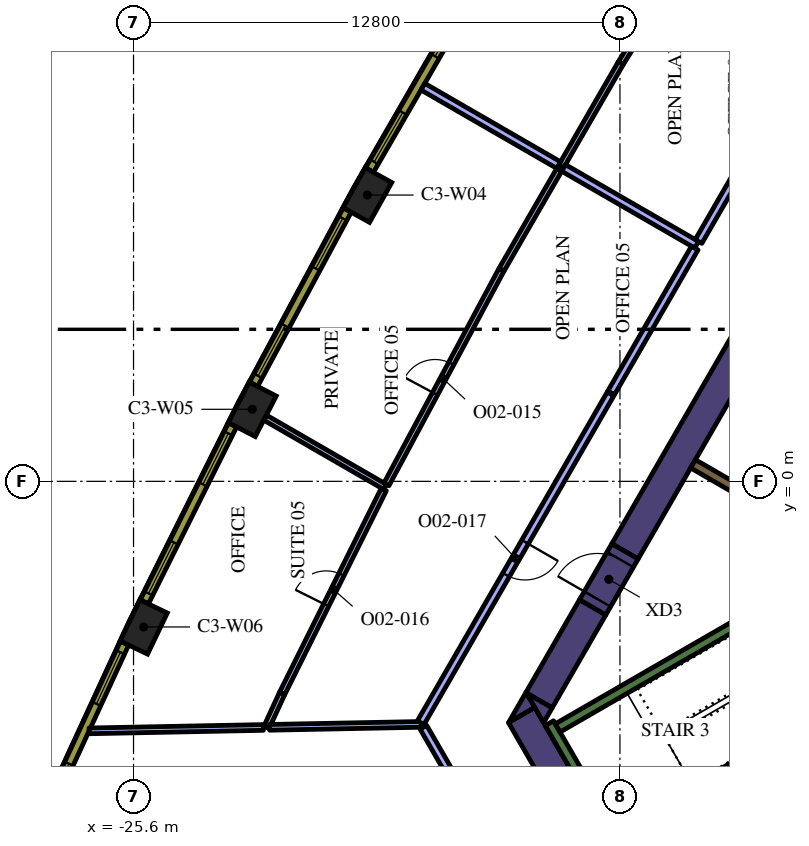
"""IFC4 building model, lengths in metres.
Left out: names, types, materials, properties, quantities, classifications, styles, units other than length and angle.
Written with IfcOpenShell. Run it as: python <this file> out.ifc"""

import sys

from ifc_helpers import new_model, si_unit, direction, frame, frame_2d, origin, origin_2d, place, context, subcontext, project, spatial, polyline, rectangle, outline, extrude, element, fill, save


model = new_model("IFC4")
c1 = context("Model", 3, precision=1e-05, world=origin(), true_north=direction((0.0, 1.0)))
c2 = subcontext(c1, "Body", "Model", "MODEL_VIEW")
j1 = project(units=[si_unit("LENGTHUNIT", "METRE"), si_unit("PLANEANGLEUNIT", "RADIAN")], contexts=[c1])
p1 = place(None, origin())
s1 = spatial("IfcSite", under=j1, at=p1, CompositionType="ELEMENT")
p2 = place(p1, origin())
s2 = spatial("IfcBuilding", under=s1, at=p2, CompositionType="ELEMENT")
p3 = place(p2, frame((0.0, 0.0, 158.4)))
s3 = spatial("IfcBuildingStorey", under=s2, at=p3, CompositionType="ELEMENT", Elevation=158.4)
for number, where, z_axis, x_axis in (
    (1, (-19.447, 7.533, 0.0), (0.0, 0.0, 1.0), (-0.487, -0.874, 0.0)),
    (2, (-22.476, 1.896, 0.0), (0.0, 0.0, 1.0), (-0.46, -0.888, 0.0)),
    (3, (-25.332, -3.832, 0.0), (0.0, 0.0, 1.0), (-0.433, -0.902, 0.0)),
):
    element("IfcColumn", number, at=place(p3, frame(where, z_axis=z_axis, x_axis=x_axis)), inside=s3, PredefinedType="COLUMN", context=c2, shape_type="SweptSolid", body=[
        extrude(rectangle(XDim=1.2, YDim=0.8, at=origin_2d()), origin(), (0.0, 0.0, 1.0), 4.2),
    ])
p4 = place(p3, frame((-15.387, -6.148, 0.0), z_axis=(0.0, 0.0, 1.0), x_axis=(0.499984020225, -0.866034629516, 0.0)))
e4 = element("IfcWall", 4, at=p4, inside=s3, PredefinedType="SOLIDWALL", context=c2, shape_type="SweptSolid", body=[
    extrude(rectangle(XDim=3.824, YDim=0.8, at=frame_2d((1.912, 0.0))), origin(), (0.0, 0.0, 1.0), 4.2),
])
p5 = place(p3, origin())
e5 = element("IfcWall", 5, at=p5, inside=s3, PredefinedType="SOLIDWALL", context=c2, shape_type="SweptSolid", body=[
    extrude(outline(polyline([(-15.042, -5.947), (-15.729, -6.343), (-15.271, -5.55), (-15.042, -5.947)])), origin(), (0.0, 0.0, 1.0), 4.2),
])
p6 = place(p3, frame((-13.518, -3.314, 0.0), z_axis=(0.0, 0.0, 1.0), x_axis=(-0.499969377405, -0.866043083026, 0.0)))
e6 = element("IfcWall", 6, at=p6, inside=s3, PredefinedType="SOLIDWALL", context=c2, shape_type="SweptSolid", body=[
    extrude(rectangle(XDim=2.824, YDim=0.8, at=frame_2d((1.412, 0.0))), origin(), (0.0, 0.0, 1.0), 4.2),
])
e7 = element("IfcWall", 7, at=p5, inside=s3, PredefinedType="SOLIDWALL", context=c2, shape_type="SweptSolid", body=[
    extrude(outline(polyline([(-14.809, -6.35), (-15.257, -5.574), (-14.585, -5.962), (-14.809, -6.35)])), origin(), (0.0, 0.0, 1.0), 4.2),
])
p7 = place(p3, frame((-12.668, -1.842, 0.0), z_axis=(0.0, 0.0, 1.0), x_axis=(0.500003640647, 0.866023301845, 0.0)))
e8 = element("IfcWall", 8, at=p7, inside=s3, PredefinedType="SOLIDWALL", context=c2, shape_type="SweptSolid", body=[
    extrude(rectangle(XDim=15.858, YDim=0.8, at=frame_2d((7.929, 0.0))), origin(), (0.0, 0.0, 1.0), 4.2),
])
p8 = place(p3, frame((-12.84, -9.511, 0.0), z_axis=(0.0, 0.0, 1.0), x_axis=(-0.499997733992, 0.866026712061, 0.0)))
e9 = element("IfcWall", 9, at=p8, inside=s3, PredefinedType="SOLIDWALL", context=c2, shape_type="SweptSolid", body=[
    extrude(rectangle(XDim=3.634, YDim=0.25, at=frame_2d((1.817, 0.0))), origin(), (0.0, 0.0, 1.0), 4.2),
])
p9 = place(p3, frame((-14.44, -6.49, 0.0), z_axis=(0.0, 0.0, 1.0), x_axis=(0.866022966069, 0.500004222222, 0.0)))
e10 = element("IfcWall", 10, at=p9, inside=s3, PredefinedType="SOLIDWALL", context=c2, shape_type="SweptSolid", body=[
    extrude(rectangle(XDim=6.8, YDim=0.25, at=frame_2d((3.4, 0.0))), origin(), (0.0, 0.0, 1.0), 4.2),
])
p10 = place(p3, frame((-12.84, -9.261, 0.0), z_axis=(0.0, 0.0, 1.0), x_axis=(0.866016039709, 0.500016218704, 0.0)))
e11 = element("IfcWall", 11, at=p10, inside=s3, PredefinedType="SOLIDWALL", context=c2, shape_type="SweptSolid", body=[
    extrude(rectangle(XDim=7.05, YDim=0.25, at=frame_2d((3.525, 0.0))), origin(), (0.0, 0.0, 1.0), 4.2),
])
p11 = place(p3, frame((-8.106, -1.14, 0.0), z_axis=(0.0, 0.0, 1.0), x_axis=(-0.866008981251, 0.500028443584, 0.0)))
e12 = element("IfcWall", 12, at=p11, inside=s3, PredefinedType="SOLIDWALL", context=c2, shape_type="SweptSolid", body=[
    extrude(rectangle(XDim=3.2, YDim=0.25, at=frame_2d((1.6, 0.0))), origin(), (0.0, 0.0, 1.0), 4.2),
])
p12 = place(p3, frame((-13.518, -3.314, 0.0), z_axis=(0.0, 0.0, 1.0), x_axis=(0.500062241894, 0.865989465428, 0.0)))
e13 = element("IfcWall", 13, at=p12, inside=s3, PredefinedType="SOLIDWALL", context=c2, shape_type="SweptSolid", body=[
    extrude(rectangle(XDim=1.7, YDim=0.8, at=frame_2d((0.85, 0.0))), origin(), (0.0, 0.0, 1.0), 4.2),
])
p13 = place(p12, frame((0.25, 0.0, 0.0)))
e14 = element("IfcOpeningElement", 14, at=p13, cuts=e13, PredefinedType="OPENING", context=c2, shape_type="SweptSolid", body=[
    extrude(rectangle(XDim=1.2, YDim=2.1, at=frame_2d((0.6, 1.05))), frame((0.0, 0.41, 0.0), z_axis=(0.0, -1.0, 0.0), x_axis=(1.0, 0.0, 0.0)), (0.0, 0.0, 1.0), 0.82),
])
p14 = place(p3, frame((-12.779, 11.002, 0.0), z_axis=(0.0, 0.0, 1.0), x_axis=(0.527026092571, 0.849849102929, 0.0)))
e15 = element("IfcWall", 15, at=p14, inside=s3, PredefinedType="PARTITIONING", context=c2, shape_type="SweptSolid", body=[
    extrude(rectangle(XDim=6.407, YDim=0.15, at=frame_2d((3.204, 0.0))), origin(), (0.0, 0.0, 1.0), 3.15),
])
p15 = place(p14, frame((2.707, 0.0, 0.0)))
e16 = element("IfcOpeningElement", 16, at=p15, cuts=e15, PredefinedType="OPENING", context=c2, shape_type="SweptSolid", body=[
    extrude(rectangle(XDim=0.9, YDim=2.1, at=frame_2d((0.45, 1.05))), frame((0.0, 0.085, 0.0), z_axis=(0.0, -1.0, 0.0), x_axis=(1.0, 0.0, 0.0)), (0.0, 0.0, 1.0), 0.17),
])
p16 = place(p3, frame((-12.779, 11.002, 0.0), z_axis=(0.0, 0.0, 1.0), x_axis=(-0.499996312652, -0.866027532665, 0.0)))
e17 = element("IfcWall", 17, at=p16, inside=s3, PredefinedType="PARTITIONING", context=c2, shape_type="SweptSolid", body=[
    extrude(rectangle(XDim=3.138, YDim=0.15, at=frame_2d((1.569, 0.0))), origin(), (0.0, 0.0, 1.0), 3.15),
])
p17 = place(p3, frame((-14.413, 8.322, 0.0), z_axis=(0.0, 0.0, 1.0), x_axis=(-0.866034795751, 0.499983732284, 0.0)))
e18 = element("IfcWall", 18, at=p17, inside=s3, PredefinedType="PARTITIONING", context=c2, shape_type="SweptSolid", body=[
    extrude(rectangle(XDim=4.125, YDim=0.2, at=frame_2d((2.062, 0.0))), origin(), (0.0, 0.0, 1.0), 3.15),
])
p18 = place(p3, frame((-10.782, 6.225, 0.0), z_axis=(0.0, 0.0, 1.0), x_axis=(-0.866034752867, 0.499983806564, 0.0)))
e19 = element("IfcWall", 19, at=p18, inside=s3, PredefinedType="PARTITIONING", context=c2, shape_type="SweptSolid", body=[
    extrude(rectangle(XDim=4.043, YDim=0.2, at=frame_2d((2.021, 0.0))), origin(), (0.0, 0.0, 1.0), 3.15),
])
p19 = place(p3, frame((-8.532, 10.122, 0.0), z_axis=(0.0, 0.0, 1.0), x_axis=(-0.499988222896, -0.866032203192, 0.0)))
e20 = element("IfcWall", 20, at=p19, inside=s3, PredefinedType="PARTITIONING", context=c2, shape_type="SweptSolid", body=[
    extrude(rectangle(XDim=4.4, YDim=0.2, at=frame_2d((2.2, 0.0))), origin(), (0.0, 0.0, 1.0), 3.15),
])
p20 = place(p3, frame((-18.98, -0.147, 0.0), z_axis=(0.0, 0.0, 1.0), x_axis=(-0.866035116605, 0.499983176524, 0.0)))
e21 = element("IfcWall", 21, at=p20, inside=s3, PredefinedType="PARTITIONING", context=c2, shape_type="SweptSolid", body=[
    extrude(rectangle(XDim=3.648, YDim=0.15, at=frame_2d((1.824, 0.0))), origin(), (0.0, 0.0, 1.0), 3.15),
])
p21 = place(p3, frame((-14.398, 8.198, 0.0), z_axis=(0.0, 0.0, 1.0), x_axis=(-0.499993740961, -0.866029017412, 0.0)))
e22 = element("IfcWall", 22, at=p21, inside=s3, PredefinedType="PARTITIONING", context=c2, shape_type="SweptSolid", body=[
    extrude(rectangle(XDim=3.038, YDim=0.15, at=frame_2d((1.519, 0.0))), origin(), (0.0, 0.0, 1.0), 3.15),
])
p22 = place(p3, frame((-18.945, -0.081, 0.0), z_axis=(0.0, 0.0, 1.0), x_axis=(0.472485737981, 0.881338316088, 0.0)))
e23 = element("IfcWall", 23, at=p22, inside=s3, PredefinedType="PARTITIONING", context=c2, shape_type="SweptSolid", body=[
    extrude(rectangle(XDim=6.407, YDim=0.15, at=frame_2d((3.204, 0.0))), origin(), (0.0, 0.0, 1.0), 3.15),
])
p23 = place(p22, frame((2.707, 0.0, 0.0)))
e24 = element("IfcOpeningElement", 24, at=p23, cuts=e23, PredefinedType="OPENING", context=c2, shape_type="SweptSolid", body=[
    extrude(rectangle(XDim=0.9, YDim=2.1, at=frame_2d((0.45, 1.05))), frame((0.0, 0.085, 0.0), z_axis=(0.0, -1.0, 0.0), x_axis=(1.0, 0.0, 0.0)), (0.0, 0.0, 1.0), 0.17),
])
p24 = place(p3, frame((-21.689, -5.579, 0.0), z_axis=(0.0, 0.0, 1.0), x_axis=(0.446219729364, 0.894923434225, 0.0)))
e25 = element("IfcWall", 25, at=p24, inside=s3, PredefinedType="PARTITIONING", context=c2, shape_type="SweptSolid", body=[
    extrude(rectangle(XDim=5.995, YDim=0.15, at=frame_2d((2.998, 0.0))), origin(), (0.0, 0.0, 1.0), 3.15),
])
p25 = place(p24, frame((2.595, 0.0, 0.0)))
e26 = element("IfcOpeningElement", 26, at=p25, cuts=e25, PredefinedType="OPENING", context=c2, shape_type="SweptSolid", body=[
    extrude(rectangle(XDim=0.9, YDim=2.1, at=frame_2d((0.45, 1.05))), frame((0.0, 0.085, 0.0), z_axis=(0.0, -1.0, 0.0), x_axis=(1.0, 0.0, 0.0)), (0.0, 0.0, 1.0), 0.17),
])
p26 = place(p3, frame((-21.689, -5.579, 0.0), z_axis=(0.0, 0.0, 1.0), x_axis=(-0.418649696334, -0.908147802816, 0.0)))
e27 = element("IfcWall", 27, at=p26, inside=s3, PredefinedType="PARTITIONING", context=c2, shape_type="SweptSolid", body=[
    extrude(rectangle(XDim=0.986, YDim=0.15, at=frame_2d((0.493, 0.0))), origin(), (0.0, 0.0, 1.0), 3.15),
])
p27 = place(p3, frame((-22.185, -6.476, 0.0), z_axis=(0.0, 0.0, 1.0), x_axis=(-0.999810025733, -0.019491342784, 0.0)))
e28 = element("IfcWall", 28, at=p27, inside=s3, PredefinedType="PARTITIONING", context=c2, shape_type="SweptSolid", body=[
    extrude(rectangle(XDim=4.584, YDim=0.15, at=frame_2d((2.292, 0.0))), origin(), (0.0, 0.0, 1.0), 3.15),
])
p28 = place(p3, frame((-18.016, -6.395, 0.0), z_axis=(0.0, 0.0, 1.0), x_axis=(-0.999809528944, -0.019516808959, 0.0)))
e29 = element("IfcWall", 29, at=p28, inside=s3, PredefinedType="PARTITIONING", context=c2, shape_type="SweptSolid", body=[
    extrude(rectangle(XDim=4.003, YDim=0.15, at=frame_2d((2.001, 0.0))), origin(), (0.0, 0.0, 1.0), 3.15),
])
p29 = place(p3, frame((-10.832, 6.138, 0.0), z_axis=(0.0, 0.0, 1.0), x_axis=(-0.499988222896, -0.866032203192, 0.0)))
e30 = element("IfcWall", 30, at=p29, inside=s3, PredefinedType="PARTITIONING", context=c2, shape_type="SweptSolid", body=[
    extrude(rectangle(XDim=4.4, YDim=0.2, at=frame_2d((2.2, 0.0))), origin(), (0.0, 0.0, 1.0), 3.15),
])
p30 = place(p3, frame((-13.047, 2.302, 0.0), z_axis=(0.0, 0.0, 1.0), x_axis=(-0.499986873641, -0.866032982159, 0.0)))
e31 = element("IfcWall", 31, at=p30, inside=s3, PredefinedType="PARTITIONING", context=c2, shape_type="SweptSolid", body=[
    extrude(rectangle(XDim=9.99, YDim=0.2, at=frame_2d((4.995, 0.0))), origin(), (0.0, 0.0, 1.0), 3.15),
])
p31 = place(p30, frame((4.5, 0.0, 0.0)))
e32 = element("IfcOpeningElement", 32, at=p31, cuts=e31, PredefinedType="OPENING", context=c2, shape_type="SweptSolid", body=[
    extrude(rectangle(XDim=1.0, YDim=2.1, at=frame_2d((0.5, 1.05))), frame((0.0, 0.11, 0.0), z_axis=(0.0, -1.0, 0.0), x_axis=(1.0, 0.0, 0.0)), (0.0, 0.0, 1.0), 0.22),
])
p32 = place(p3, frame((-17.974, -6.469, 0.0), z_axis=(0.0, 0.0, 1.0), x_axis=(0.499961062019, -0.866047883471, 0.0)))
e33 = element("IfcWall", 33, at=p32, inside=s3, PredefinedType="PARTITIONING", context=c2, shape_type="SweptSolid", body=[
    extrude(rectangle(XDim=2.185, YDim=0.2, at=frame_2d((1.092, 0.0))), origin(), (0.0, 0.0, 1.0), 3.15),
])
p33 = place(p3, frame((-16.789, 12.697, 0.0), z_axis=(0.0, 0.0, 1.0), x_axis=(-0.500009456303, -0.866019944116, 0.0)))
e34 = element("IfcWall", 34, at=p33, inside=s3, PredefinedType="SOLIDWALL", context=c2, shape_type="SweptSolid", body=[
    extrude(rectangle(XDim=5.204, YDim=0.24, at=frame_2d((2.602, 0.0))), origin(), (0.0, 0.0, 1.0), 3.95),
])
p34 = place(p33, frame((0.248, 0.0, 0.9)))
e35 = element("IfcOpeningElement", 35, at=p34, cuts=e34, PredefinedType="OPENING", context=c2, shape_type="SweptSolid", body=[
    extrude(rectangle(XDim=1.5, YDim=2.55, at=frame_2d((0.75, 1.275))), frame((0.0, 0.13, 0.0), z_axis=(0.0, -1.0, 0.0), x_axis=(1.0, 0.0, 0.0)), (0.0, 0.0, 1.0), 0.26),
])
p35 = place(p33, frame((3.455, 0.0, 0.9)))
e36 = element("IfcOpeningElement", 36, at=p35, cuts=e34, PredefinedType="OPENING", context=c2, shape_type="SweptSolid", body=[
    extrude(rectangle(XDim=1.5, YDim=2.55, at=frame_2d((0.75, 1.275))), frame((0.0, 0.13, 0.0), z_axis=(0.0, -1.0, 0.0), x_axis=(1.0, 0.0, 0.0)), (0.0, 0.0, 1.0), 0.26),
])
p36 = place(p3, frame((-19.977, 7.139, 0.0), z_axis=(0.0, 0.0, 1.0), x_axis=(-0.473349833294, -0.880874528704, 0.0)))
e37 = element("IfcWall", 37, at=p36, inside=s3, PredefinedType="SOLIDWALL", context=c2, shape_type="SweptSolid", body=[
    extrude(rectangle(XDim=5.204, YDim=0.24, at=frame_2d((2.602, 0.0))), origin(), (0.0, 0.0, 1.0), 3.95),
])
p37 = place(p36, frame((0.248, 0.0, 0.9)))
e38 = element("IfcOpeningElement", 38, at=p37, cuts=e37, PredefinedType="OPENING", context=c2, shape_type="SweptSolid", body=[
    extrude(rectangle(XDim=1.5, YDim=2.55, at=frame_2d((0.75, 1.275))), frame((0.0, 0.13, 0.0), z_axis=(0.0, -1.0, 0.0), x_axis=(1.0, 0.0, 0.0)), (0.0, 0.0, 1.0), 0.26),
])
p38 = place(p36, frame((3.455, 0.0, 0.9)))
e39 = element("IfcOpeningElement", 39, at=p38, cuts=e37, PredefinedType="OPENING", context=c2, shape_type="SweptSolid", body=[
    extrude(rectangle(XDim=1.5, YDim=2.55, at=frame_2d((0.75, 1.275))), frame((0.0, 0.13, 0.0), z_axis=(0.0, -1.0, 0.0), x_axis=(1.0, 0.0, 0.0)), (0.0, 0.0, 1.0), 0.26),
])
p39 = place(p3, frame((-22.994, 1.485, 0.0), z_axis=(0.0, 0.0, 1.0), x_axis=(-0.446256171312, -0.8949052629, 0.0)))
e40 = element("IfcWall", 40, at=p39, inside=s3, PredefinedType="SOLIDWALL", context=c2, shape_type="SweptSolid", body=[
    extrude(rectangle(XDim=5.203, YDim=0.24, at=frame_2d((2.602, 0.0))), origin(), (0.0, 0.0, 1.0), 3.95),
])
p40 = place(p39, frame((0.248, 0.0, 0.9)))
e41 = element("IfcOpeningElement", 41, at=p40, cuts=e40, PredefinedType="OPENING", context=c2, shape_type="SweptSolid", body=[
    extrude(rectangle(XDim=1.5, YDim=2.55, at=frame_2d((0.75, 1.275))), frame((0.0, 0.13, 0.0), z_axis=(0.0, -1.0, 0.0), x_axis=(1.0, 0.0, 0.0)), (0.0, 0.0, 1.0), 0.26),
])
p41 = place(p39, frame((3.455, 0.0, 0.9)))
e42 = element("IfcOpeningElement", 42, at=p41, cuts=e40, PredefinedType="OPENING", context=c2, shape_type="SweptSolid", body=[
    extrude(rectangle(XDim=1.5, YDim=2.55, at=frame_2d((0.75, 1.275))), frame((0.0, 0.13, 0.0), z_axis=(0.0, -1.0, 0.0), x_axis=(1.0, 0.0, 0.0)), (0.0, 0.0, 1.0), 0.26),
])
p42 = place(p3, frame((-25.837, -4.258, 0.0), z_axis=(0.0, 0.0, 1.0), x_axis=(-0.418722559465, -0.908114209885, 0.0)))
e43 = element("IfcWall", 43, at=p42, inside=s3, PredefinedType="SOLIDWALL", context=c2, shape_type="SweptSolid", body=[
    extrude(rectangle(XDim=5.213, YDim=0.24, at=frame_2d((2.606, 0.0))), origin(), (0.0, 0.0, 1.0), 3.95),
])
p43 = place(p42, frame((0.261, 0.0, 0.9)))
e44 = element("IfcOpeningElement", 44, at=p43, cuts=e43, PredefinedType="OPENING", context=c2, shape_type="SweptSolid", body=[
    extrude(rectangle(XDim=1.5, YDim=2.55, at=frame_2d((0.75, 1.275))), frame((0.0, 0.13, 0.0), z_axis=(0.0, -1.0, 0.0), x_axis=(1.0, 0.0, 0.0)), (0.0, 0.0, 1.0), 0.26),
])
p44 = place(p42, frame((3.492, 0.0, 0.9)))
e45 = element("IfcOpeningElement", 45, at=p44, cuts=e43, PredefinedType="OPENING", context=c2, shape_type="SweptSolid", body=[
    extrude(rectangle(XDim=1.5, YDim=2.55, at=frame_2d((0.75, 1.275))), frame((0.0, 0.13, 0.0), z_axis=(0.0, -1.0, 0.0), x_axis=(1.0, 0.0, 0.0)), (0.0, 0.0, 1.0), 0.26),
])
p45 = place(p13, origin())
e46 = element("IfcDoor", 46, at=p45, inside=s3, OperationType="SINGLE_SWING_LEFT", PredefinedType="DOOR", context=c2, shape_type="SweptSolid", body=[
    extrude(rectangle(XDim=1.2, YDim=2.1, at=frame_2d((0.6, 1.05))), frame((0.0, 0.025, 0.0), z_axis=(0.0, -1.0, 0.0), x_axis=(1.0, 0.0, 0.0)), (0.0, 0.0, 1.0), 0.05),
])
fill(e14, e46)
p46 = place(p23, origin())
e47 = element("IfcDoor", 47, at=p46, inside=s3, OperationType="SINGLE_SWING_LEFT", PredefinedType="DOOR", context=c2, shape_type="SweptSolid", body=[
    extrude(rectangle(XDim=0.9, YDim=2.1, at=frame_2d((0.45, 1.05))), frame((0.0, 0.025, 0.0), z_axis=(0.0, -1.0, 0.0), x_axis=(1.0, 0.0, 0.0)), (0.0, 0.0, 1.0), 0.05),
])
fill(e24, e47)
p47 = place(p25, origin())
e48 = element("IfcDoor", 48, at=p47, inside=s3, OperationType="SINGLE_SWING_RIGHT", PredefinedType="DOOR", context=c2, shape_type="SweptSolid", body=[
    extrude(rectangle(XDim=0.9, YDim=2.1, at=frame_2d((0.45, 1.05))), frame((0.0, 0.025, 0.0), z_axis=(0.0, -1.0, 0.0), x_axis=(1.0, 0.0, 0.0)), (0.0, 0.0, 1.0), 0.05),
])
fill(e26, e48)
p48 = place(p31, origin())
e49 = element("IfcDoor", 49, at=p48, inside=s3, OperationType="SINGLE_SWING_RIGHT", PredefinedType="DOOR", context=c2, shape_type="SweptSolid", body=[
    extrude(rectangle(XDim=1.0, YDim=2.1, at=frame_2d((0.5, 1.05))), frame((0.0, 0.025, 0.0), z_axis=(0.0, -1.0, 0.0), x_axis=(1.0, 0.0, 0.0)), (0.0, 0.0, 1.0), 0.05),
])
fill(e32, e49)
p49 = place(p34, origin())
e50 = element("IfcWindow", 50, at=p49, inside=s3, PartitioningType="SINGLE_PANEL", PredefinedType="WINDOW", context=c2, shape_type="SweptSolid", body=[
    extrude(rectangle(XDim=1.5, YDim=2.55, at=frame_2d((0.75, 1.275))), frame((0.0, 0.04, 0.0), z_axis=(0.0, -1.0, 0.0), x_axis=(1.0, 0.0, 0.0)), (0.0, 0.0, 1.0), 0.06),
])
fill(e35, e50)
p50 = place(p35, origin())
e51 = element("IfcWindow", 51, at=p50, inside=s3, PartitioningType="SINGLE_PANEL", PredefinedType="WINDOW", context=c2, shape_type="SweptSolid", body=[
    extrude(rectangle(XDim=1.5, YDim=2.55, at=frame_2d((0.75, 1.275))), frame((0.0, 0.04, 0.0), z_axis=(0.0, -1.0, 0.0), x_axis=(1.0, 0.0, 0.0)), (0.0, 0.0, 1.0), 0.06),
])
fill(e36, e51)
p51 = place(p37, origin())
e52 = element("IfcWindow", 52, at=p51, inside=s3, PartitioningType="SINGLE_PANEL", PredefinedType="WINDOW", context=c2, shape_type="SweptSolid", body=[
    extrude(rectangle(XDim=1.5, YDim=2.55, at=frame_2d((0.75, 1.275))), frame((0.0, 0.04, 0.0), z_axis=(0.0, -1.0, 0.0), x_axis=(1.0, 0.0, 0.0)), (0.0, 0.0, 1.0), 0.06),
])
fill(e38, e52)
p52 = place(p38, origin())
e53 = element("IfcWindow", 53, at=p52, inside=s3, PartitioningType="SINGLE_PANEL", PredefinedType="WINDOW", context=c2, shape_type="SweptSolid", body=[
    extrude(rectangle(XDim=1.5, YDim=2.55, at=frame_2d((0.75, 1.275))), frame((0.0, 0.04, 0.0), z_axis=(0.0, -1.0, 0.0), x_axis=(1.0, 0.0, 0.0)), (0.0, 0.0, 1.0), 0.06),
])
fill(e39, e53)
p53 = place(p40, origin())
e54 = element("IfcWindow", 54, at=p53, inside=s3, PartitioningType="SINGLE_PANEL", PredefinedType="WINDOW", context=c2, shape_type="SweptSolid", body=[
    extrude(rectangle(XDim=1.5, YDim=2.55, at=frame_2d((0.75, 1.275))), frame((0.0, 0.04, 0.0), z_axis=(0.0, -1.0, 0.0), x_axis=(1.0, 0.0, 0.0)), (0.0, 0.0, 1.0), 0.06),
])
fill(e41, e54)
p54 = place(p41, origin())
e55 = element("IfcWindow", 55, at=p54, inside=s3, PartitioningType="SINGLE_PANEL", PredefinedType="WINDOW", context=c2, shape_type="SweptSolid", body=[
    extrude(rectangle(XDim=1.5, YDim=2.55, at=frame_2d((0.75, 1.275))), frame((0.0, 0.04, 0.0), z_axis=(0.0, -1.0, 0.0), x_axis=(1.0, 0.0, 0.0)), (0.0, 0.0, 1.0), 0.06),
])
fill(e42, e55)
p55 = place(p43, origin())
e56 = element("IfcWindow", 56, at=p55, inside=s3, PartitioningType="SINGLE_PANEL", PredefinedType="WINDOW", context=c2, shape_type="SweptSolid", body=[
    extrude(rectangle(XDim=1.5, YDim=2.55, at=frame_2d((0.75, 1.275))), frame((0.0, 0.04, 0.0), z_axis=(0.0, -1.0, 0.0), x_axis=(1.0, 0.0, 0.0)), (0.0, 0.0, 1.0), 0.06),
])
fill(e44, e56)
p56 = place(p44, origin())
e57 = element("IfcWindow", 57, at=p56, inside=s3, PartitioningType="SINGLE_PANEL", PredefinedType="WINDOW", context=c2, shape_type="SweptSolid", body=[
    extrude(rectangle(XDim=1.5, YDim=2.55, at=frame_2d((0.75, 1.275))), frame((0.0, 0.04, 0.0), z_axis=(0.0, -1.0, 0.0), x_axis=(1.0, 0.0, 0.0)), (0.0, 0.0, 1.0), 0.06),
])
fill(e45, e57)
save(model, sys.argv[1])
